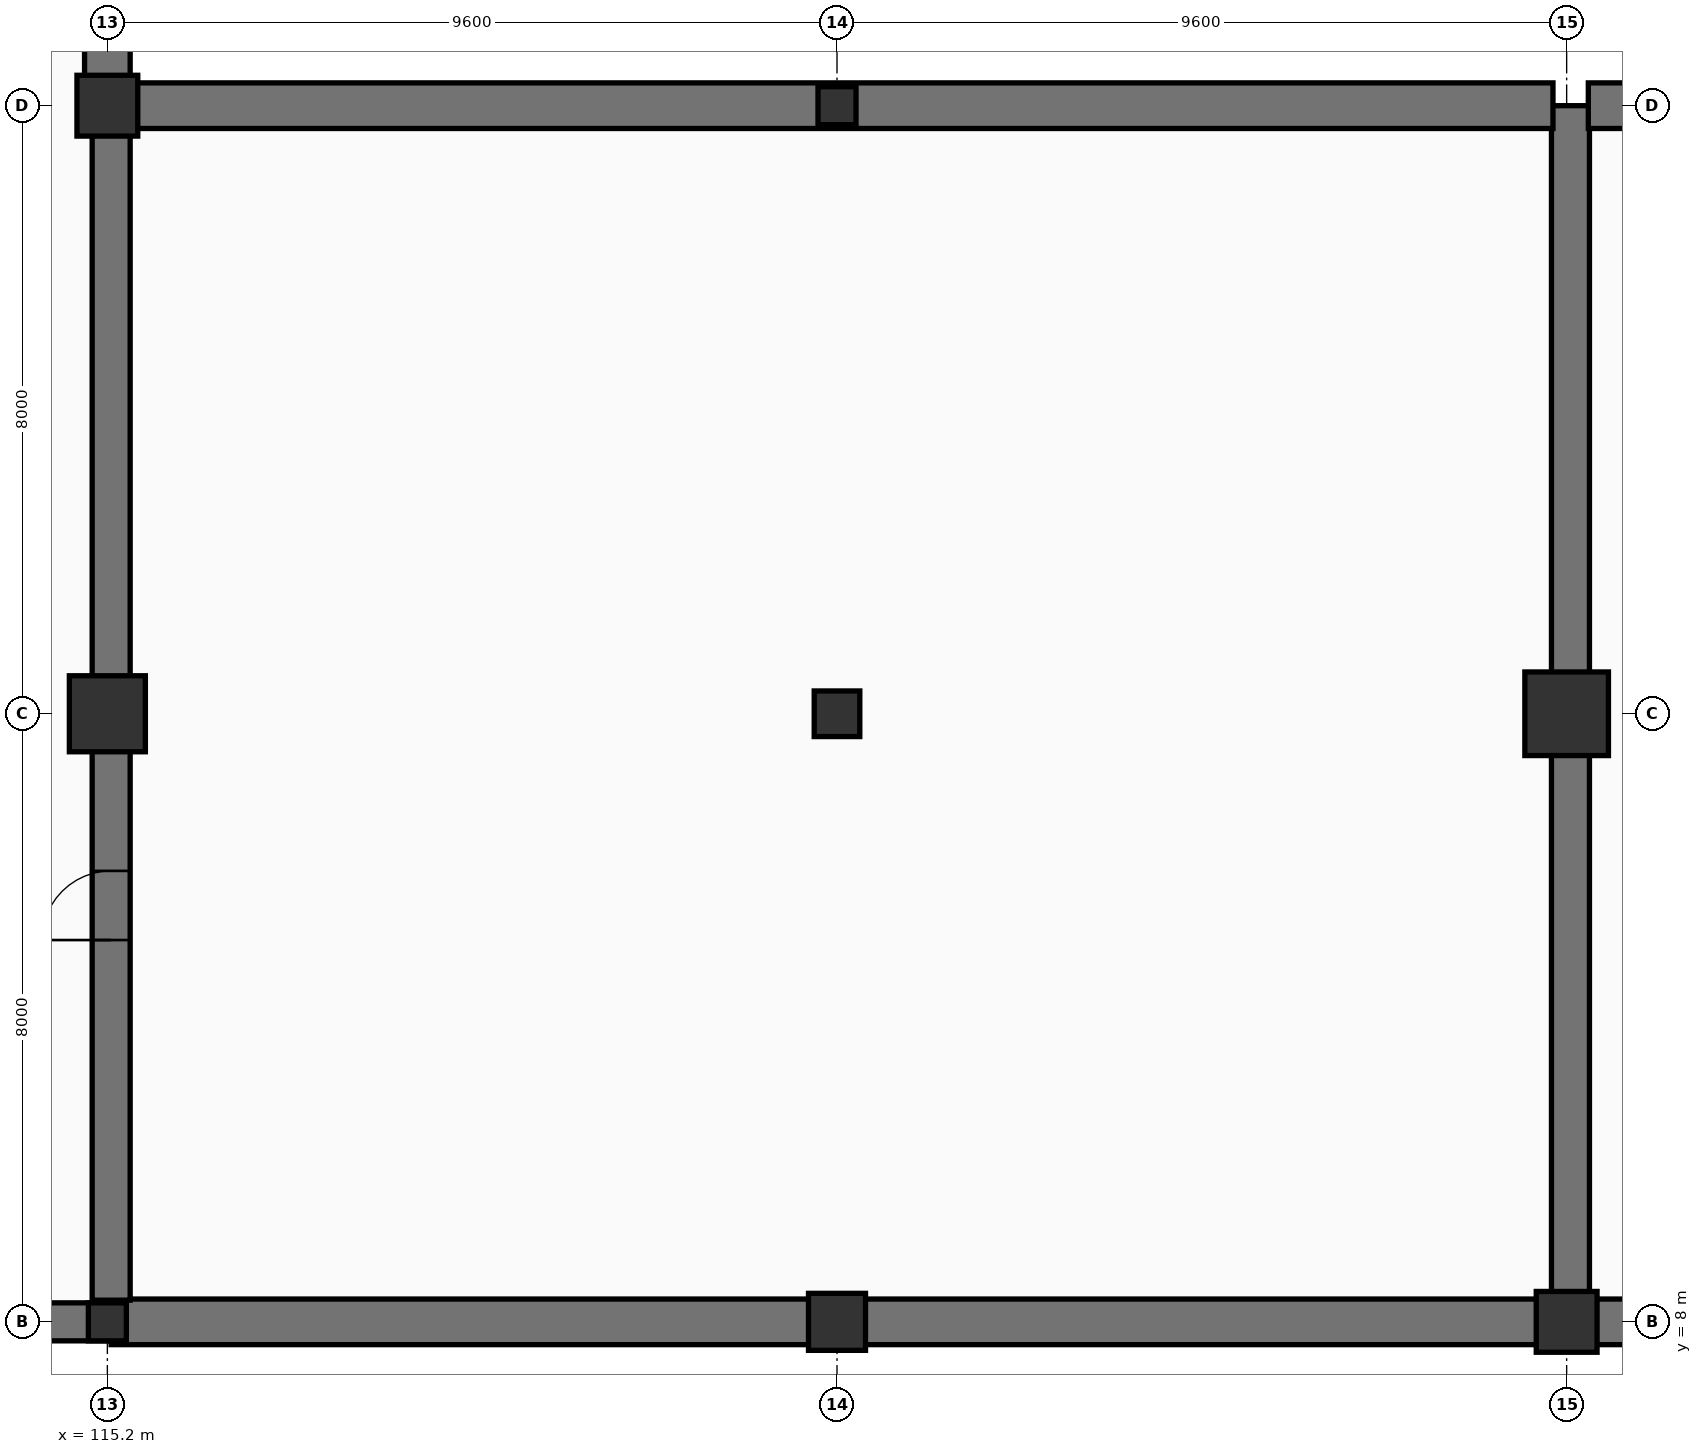
"""IFC4 building model, lengths in metres.
Left out: names, types, materials, properties, quantities, classifications, styles, units other than length and angle.
Written with IfcOpenShell. Run it as: python <this file> out.ifc"""

import sys

from ifc_helpers import new_model, si_unit, direction, frame, frame_2d, origin, origin_2d, place, context, subcontext, project, spatial, rectangle, circle, extrude, element, fill, save


model = new_model("IFC4")
c1 = context("Model", 3, precision=1e-05, world=origin(), true_north=direction((0.0, 1.0)))
c2 = subcontext(c1, "Body", "Model", "MODEL_VIEW")
j1 = project(units=[si_unit("LENGTHUNIT", "METRE"), si_unit("PLANEANGLEUNIT", "RADIAN")], contexts=[c1])
p1 = place(None, origin())
s1 = spatial("IfcSite", under=j1, at=p1, CompositionType="ELEMENT")
p2 = place(p1, origin())
s2 = spatial("IfcBuilding", under=s1, at=p2, CompositionType="ELEMENT")
p3 = place(p2, frame((0.0, 0.0, -5.4)))
s3 = spatial("IfcBuildingStorey", under=s2, at=p3, CompositionType="ELEMENT", Elevation=-5.4)
p4 = place(p3, frame((115.2, 8.0, 0.0), z_axis=(0.0, 0.0, 1.0), x_axis=(1.0, 0.0, 0.0)))
e1 = element("IfcColumn", 1, at=p4, inside=s3, PredefinedType="COLUMN", context=c2, shape_type="SweptSolid", body=[
    extrude(rectangle(XDim=0.5, YDim=0.5, at=origin_2d()), origin(), (0.0, 0.0, 1.0), 5.4),
])
p5 = place(p3, frame((115.2, 16.0, 0.0), z_axis=(0.0, 0.0, 1.0), x_axis=(1.0, 0.0, 0.0)))
e2 = element("IfcColumn", 2, at=p5, inside=s3, PredefinedType="COLUMN", context=c2, shape_type="SweptSolid", body=[
    extrude(circle(Radius=0.5, at=origin_2d()), origin(), (0.0, 0.0, 1.0), 5.4),
])
p6 = place(p3, frame((115.2, 24.0, 0.0), z_axis=(0.0, 0.0, 1.0), x_axis=(1.0, 0.0, 0.0)))
e3 = element("IfcColumn", 3, at=p6, inside=s3, PredefinedType="COLUMN", context=c2, shape_type="SweptSolid", body=[
    extrude(circle(Radius=0.4, at=origin_2d()), origin(), (0.0, 0.0, 1.0), 5.4),
])
p7 = place(p3, frame((124.8, 8.0, 0.0), z_axis=(0.0, 0.0, 1.0), x_axis=(1.0, 0.0, 0.0)))
e4 = element("IfcColumn", 4, at=p7, inside=s3, PredefinedType="COLUMN", context=c2, shape_type="SweptSolid", body=[
    extrude(rectangle(XDim=0.75, YDim=0.75, at=origin_2d()), origin(), (0.0, 0.0, 1.0), 5.4),
])
p8 = place(p3, frame((124.8, 16.0, 0.0), z_axis=(0.0, 0.0, 1.0), x_axis=(1.0, 0.0, 0.0)))
e5 = element("IfcColumn", 5, at=p8, inside=s3, PredefinedType="COLUMN", context=c2, shape_type="SweptSolid", body=[
    extrude(rectangle(XDim=0.6, YDim=0.6, at=origin_2d()), origin(), (0.0, 0.0, 1.0), 5.4),
])
p9 = place(p3, frame((124.8, 24.0, 0.0), z_axis=(0.0, 0.0, 1.0), x_axis=(1.0, 0.0, 0.0)))
e6 = element("IfcColumn", 6, at=p9, inside=s3, PredefinedType="COLUMN", context=c2, shape_type="SweptSolid", body=[
    extrude(rectangle(XDim=0.5, YDim=0.5, at=origin_2d()), origin(), (0.0, 0.0, 1.0), 5.4),
])
p10 = place(p3, frame((134.4, 8.0, 0.0), z_axis=(0.0, 0.0, 1.0), x_axis=(1.0, 0.0, 0.0)))
e7 = element("IfcColumn", 7, at=p10, inside=s3, PredefinedType="COLUMN", context=c2, shape_type="SweptSolid", body=[
    extrude(circle(Radius=0.4, at=origin_2d()), origin(), (0.0, 0.0, 1.0), 5.4),
])
p11 = place(p3, frame((134.4, 16.0, 0.0), z_axis=(0.0, 0.0, 1.0), x_axis=(1.0, 0.0, 0.0)))
e8 = element("IfcColumn", 8, at=p11, inside=s3, PredefinedType="COLUMN", context=c2, shape_type="SweptSolid", body=[
    extrude(rectangle(XDim=1.1, YDim=1.1, at=origin_2d()), origin(), (0.0, 0.0, 1.0), 5.4),
])
p12 = place(p3, frame((144.0, 8.0, 0.0), z_axis=(0.0, 0.0, 1.0), x_axis=(-1.0, 0.0, 0.0)))
e9 = element("IfcWall", 9, at=p12, inside=s3, PredefinedType="SHEAR", context=c2, shape_type="SweptSolid", body=[
    extrude(rectangle(XDim=9.55, YDim=0.6, at=frame_2d((4.775, 0.0))), origin(), (0.0, 0.0, 1.0), 5.09),
])
p13 = place(p3, frame((134.45, 8.285, 0.0), z_axis=(0.0, 0.0, 1.0), x_axis=(0.0, 1.0, 0.0)))
e10 = element("IfcWall", 10, at=p13, inside=s3, PredefinedType="SHEAR", context=c2, shape_type="SweptSolid", body=[
    extrude(rectangle(XDim=15.715, YDim=0.5, at=frame_2d((7.857, 0.0))), origin(), (0.0, 0.0, 1.0), 5.11),
])
p14 = place(p3, frame((134.685, 24.0, 0.0), z_axis=(0.0, 0.0, 1.0), x_axis=(1.0, 0.0, 0.0)))
e11 = element("IfcWall", 11, at=p14, inside=s3, PredefinedType="SHEAR", context=c2, shape_type="SweptSolid", body=[
    extrude(rectangle(XDim=9.315, YDim=0.6, at=frame_2d((4.657, 0.0))), origin(), (0.0, 0.0, 1.0), 5.09),
])
p15 = place(p3, frame((134.47, 8.0, 0.0), z_axis=(0.0, 0.0, 1.0), x_axis=(-1.0, 0.0, 0.0)))
e12 = element("IfcWall", 12, at=p15, inside=s3, PredefinedType="SHEAR", context=c2, shape_type="SweptSolid", body=[
    extrude(rectangle(XDim=19.22, YDim=0.6, at=frame_2d((9.61, 0.0))), origin(), (0.0, 0.0, 1.0), 5.09),
])
p16 = place(p3, frame((115.25, 8.285, 0.0), z_axis=(0.0, 0.0, 1.0), x_axis=(0.0, 1.0, 0.0)))
e13 = element("IfcWall", 13, at=p16, inside=s3, PredefinedType="SHEAR", context=c2, shape_type="SweptSolid", body=[
    extrude(rectangle(XDim=15.715, YDim=0.5, at=frame_2d((7.857, 0.0))), origin(), (0.0, 0.0, 1.0), 5.09),
])
p17 = place(p16, frame((4.738, 0.0, 0.0)))
e14 = element("IfcOpeningElement", 14, at=p17, cuts=e13, PredefinedType="OPENING", context=c2, shape_type="SweptSolid", body=[
    extrude(rectangle(XDim=0.91, YDim=2.08, at=frame_2d((0.455, 1.04))), frame((0.0, 0.26, 0.0), z_axis=(0.0, -1.0, 0.0), x_axis=(1.0, 0.0, 0.0)), (0.0, 0.0, 1.0), 0.52),
])
p18 = place(p3, frame((115.485, 24.0, 0.0), z_axis=(0.0, 0.0, 1.0), x_axis=(1.0, 0.0, 0.0)))
e15 = element("IfcWall", 15, at=p18, inside=s3, PredefinedType="SHEAR", context=c2, shape_type="SweptSolid", body=[
    extrude(rectangle(XDim=18.735, YDim=0.6, at=frame_2d((9.367, 0.0))), origin(), (0.0, 0.0, 1.0), 5.09),
])
p19 = place(p3, frame((115.2, 56.305, 0.0), z_axis=(0.0, 0.0, 1.0), x_axis=(0.0, -1.0, 0.0)))
e16 = element("IfcWall", 16, at=p19, inside=s3, PredefinedType="SHEAR", context=c2, shape_type="SweptSolid", body=[
    extrude(rectangle(XDim=32.325, YDim=0.6, at=frame_2d((16.163, 0.0))), origin(), (0.0, 0.0, 1.0), 4.95),
])
p20 = place(p3, frame((115.27, 8.0, 0.0), z_axis=(0.0, 0.0, 1.0), x_axis=(-1.0, 0.0, 0.0)))
e17 = element("IfcWall", 17, at=p20, inside=s3, PredefinedType="SHEAR", context=c2, shape_type="SweptSolid", body=[
    extrude(rectangle(XDim=57.67, YDim=0.5, at=frame_2d((28.835, 0.0))), origin(), (0.0, 0.0, 1.0), 5.09),
])
p21 = place(p17, origin())
e18 = element("IfcDoor", 18, at=p21, inside=s3, OperationType="SINGLE_SWING_RIGHT", PredefinedType="DOOR", context=c2, shape_type="SweptSolid", body=[
    extrude(rectangle(XDim=0.91, YDim=2.08, at=frame_2d((0.455, 1.04))), frame((0.0, 0.025, 0.0), z_axis=(0.0, -1.0, 0.0), x_axis=(1.0, 0.0, 0.0)), (0.0, 0.0, 1.0), 0.05),
])
fill(e14, e18)
save(model, sys.argv[1])
